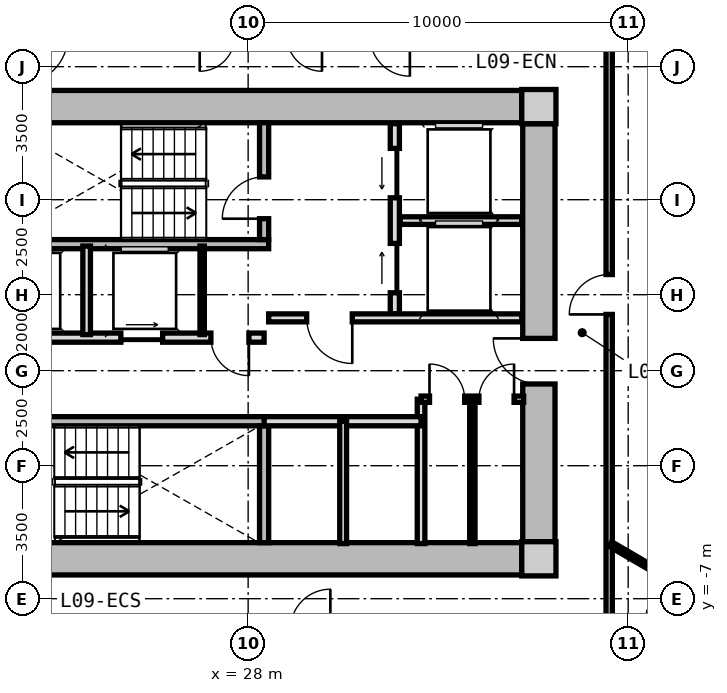
"""IFC4 building model, lengths in metres.
Left out: names, types, materials, properties, quantities, classifications, styles, units other than length and angle.
Written with IfcOpenShell. Run it as: python <this file> out.ifc"""

import sys

from ifc_helpers import new_model, si_unit, direction, frame, frame_2d, origin, origin_2d, place, context, subcontext, project, spatial, rectangle, extrude, source, transform, mapped, element, fill, save


model = new_model("IFC4")
c1 = context("Model", 3, precision=1e-05, world=origin(), true_north=direction((0.0, 1.0)))
c2 = subcontext(c1, "Body", "Model", "MODEL_VIEW")
j1 = project(units=[si_unit("LENGTHUNIT", "METRE"), si_unit("PLANEANGLEUNIT", "RADIAN")], contexts=[c1])
p1 = place(None, origin())
s1 = spatial("IfcSite", under=j1, at=p1, CompositionType="ELEMENT")
p2 = place(p1, origin())
s2 = spatial("IfcBuilding", under=s1, at=p2, CompositionType="ELEMENT")
p3 = place(p2, frame((0.0, 0.0, 33.8)))
s3 = spatial("IfcBuildingStorey", under=s2, at=p3, CompositionType="ELEMENT", Elevation=33.8)
m1 = source(origin(), c2, "Body", "SweptSolid", [
    extrude(rectangle(XDim=0.9, YDim=0.9, at=origin_2d()), origin(), (0.0, 0.0, 1.0), 3.05),
])
for number, where, z_axis, x_axis in (
    (1, (35.65, -5.95, 0.0), (0.0, 0.0, 1.0), (1.0, 0.0, 0.0)),
    (2, (35.65, 5.95, 0.0), (0.0, 0.0, 1.0), (1.0, 0.0, 0.0)),
):
    element("IfcColumn", number, at=place(p3, frame(where, z_axis=z_axis, x_axis=x_axis)), inside=s3, PredefinedType="COLUMN", context=c2, shape_type="MappedRepresentation", body=[
        mapped(m1, transform((0.0, 0.0, 0.0), x_axis=(1.0, 0.0, 0.0), y_axis=(0.0, 1.0, 0.0), z_axis=(0.0, 0.0, 1.0), scale=1.0)),
    ])
m2 = source(origin(), c2, "Body", "SweptSolid", [
    extrude(rectangle(XDim=14.4, YDim=0.85, at=frame_2d((7.2, 0.0))), origin(), (0.0, 0.0, 1.0), 2.79),
])
for number, where, z_axis, x_axis in (
    (3, (20.8, 5.95, 0.0), (0.0, 0.0, 1.0), (1.0, 0.0, 0.0)),
    (4, (35.2, -5.95, 0.0), (0.0, 0.0, 1.0), (-1.0, 0.0, 0.0)),
):
    element("IfcWall", number, at=place(p3, frame(where, z_axis=z_axis, x_axis=x_axis)), inside=s3, PredefinedType="SHEAR", context=c2, shape_type="MappedRepresentation", body=[
        mapped(m2, transform((0.0, 0.0, 0.0), x_axis=(1.0, 0.0, 0.0), y_axis=(0.0, 1.0, 0.0), z_axis=(0.0, 0.0, 1.0), scale=1.0)),
    ])
m3 = source(origin(), c2, "Body", "SweptSolid", [
    extrude(rectangle(XDim=11.0, YDim=0.85, at=frame_2d((5.5, 0.0))), origin(), (0.0, 0.0, 1.0), 2.79),
])
p4 = place(p3, frame((35.65, 5.5, 0.0), z_axis=(0.0, 0.0, 1.0), x_axis=(0.0, -1.0, 0.0)))
e5 = element("IfcWall", 5, at=p4, inside=s3, PredefinedType="SHEAR", context=c2, shape_type="MappedRepresentation", body=[
    mapped(m3, transform((0.0, 0.0, 0.0), x_axis=(1.0, 0.0, 0.0), y_axis=(0.0, 1.0, 0.0), z_axis=(0.0, 0.0, 1.0), scale=1.0)),
])
p5 = place(p4, frame((5.65, 0.0, 0.0)))
e6 = element("IfcOpeningElement", 6, at=p5, cuts=e5, PredefinedType="OPENING", context=c2, shape_type="SweptSolid", body=[
    extrude(rectangle(XDim=1.2, YDim=2.15, at=frame_2d((0.6, 1.075))), frame((0.0, 0.435, 0.0), z_axis=(0.0, -1.0, 0.0), x_axis=(1.0, 0.0, 0.0)), (0.0, 0.0, 1.0), 0.87),
])
m4 = source(origin(), c2, "Body", "SweptSolid", [
    extrude(rectangle(XDim=7.765, YDim=0.24, at=frame_2d((3.883, 0.0))), origin(), (0.0, 0.0, 1.0), 2.79),
])
p6 = place(p3, frame((20.775, 2.33, 0.0), z_axis=(0.0, 0.0, 1.0), x_axis=(1.0, 0.0, 0.0)))
e7 = element("IfcWall", 7, at=p6, inside=s3, PredefinedType="PARTITIONING", context=c2, shape_type="MappedRepresentation", body=[
    mapped(m4, transform((0.0, 0.0, 0.0), x_axis=(1.0, 0.0, 0.0), y_axis=(0.0, 1.0, 0.0), z_axis=(0.0, 0.0, 1.0), scale=1.0)),
])
m5 = source(origin(), c2, "Body", "SweptSolid", [
    extrude(rectangle(XDim=3.075, YDim=0.24, at=frame_2d((1.538, 0.0))), origin(), (0.0, 0.0, 1.0), 2.79),
])
p7 = place(p3, frame((28.42, 2.45, 0.0), z_axis=(0.0, 0.0, 1.0), x_axis=(0.0, 1.0, 0.0)))
e8 = element("IfcWall", 8, at=p7, inside=s3, PredefinedType="PARTITIONING", context=c2, shape_type="MappedRepresentation", body=[
    mapped(m5, transform((0.0, 0.0, 0.0), x_axis=(1.0, 0.0, 0.0), y_axis=(0.0, 1.0, 0.0), z_axis=(0.0, 0.0, 1.0), scale=1.0)),
])
p8 = place(p7, frame((0.55, 0.0, 0.0)))
e9 = element("IfcOpeningElement", 9, at=p8, cuts=e8, PredefinedType="OPENING", context=c2, shape_type="SweptSolid", body=[
    extrude(rectangle(XDim=1.1, YDim=2.15, at=frame_2d((0.55, 1.075))), frame((0.0, 0.13, 0.0), z_axis=(0.0, -1.0, 0.0), x_axis=(1.0, 0.0, 0.0)), (0.0, 0.0, 1.0), 0.26),
])
p9 = place(p3, frame((20.775, -2.33, 0.0), z_axis=(0.0, 0.0, 1.0), x_axis=(1.0, 0.0, 0.0)))
e10 = element("IfcWall", 10, at=p9, inside=s3, PredefinedType="PARTITIONING", context=c2, shape_type="MappedRepresentation", body=[
    mapped(m4, transform((0.0, 0.0, 0.0), x_axis=(1.0, 0.0, 0.0), y_axis=(0.0, 1.0, 0.0), z_axis=(0.0, 0.0, 1.0), scale=1.0)),
])
p10 = place(p9, frame((0.885, 0.0, 0.0)))
e11 = element("IfcOpeningElement", 11, at=p10, cuts=e10, PredefinedType="OPENING", context=c2, shape_type="SweptSolid", body=[
    extrude(rectangle(XDim=1.1, YDim=2.15, at=frame_2d((0.55, 1.075))), frame((0.0, 0.13, 0.0), z_axis=(0.0, -1.0, 0.0), x_axis=(1.0, 0.0, 0.0)), (0.0, 0.0, 1.0), 0.26),
])
p11 = place(p3, frame((28.42, -5.525, 0.0), z_axis=(0.0, 0.0, 1.0), x_axis=(0.0, 1.0, 0.0)))
e12 = element("IfcWall", 12, at=p11, inside=s3, PredefinedType="PARTITIONING", context=c2, shape_type="MappedRepresentation", body=[
    mapped(m5, transform((0.0, 0.0, 0.0), x_axis=(1.0, 0.0, 0.0), y_axis=(0.0, 1.0, 0.0), z_axis=(0.0, 0.0, 1.0), scale=1.0)),
])
m6 = source(origin(), c2, "Body", "SweptSolid", [
    extrude(rectangle(XDim=5.0, YDim=0.24, at=frame_2d((2.5, 0.0))), origin(), (0.0, 0.0, 1.0), 2.775),
])
p12 = place(p3, frame((31.86, 0.5, 0.0), z_axis=(0.0, 0.0, 1.0), x_axis=(0.0, 1.0, 0.0)))
e13 = element("IfcWall", 13, at=p12, inside=s3, PredefinedType="PARTITIONING", context=c2, shape_type="MappedRepresentation", body=[
    mapped(m6, transform((0.0, 0.0, 0.0), x_axis=(1.0, 0.0, 0.0), y_axis=(0.0, 1.0, 0.0), z_axis=(0.0, 0.0, 1.0), scale=1.0)),
])
p13 = place(p12, frame((3.05, 0.0, 0.0)))
e14 = element("IfcOpeningElement", 14, at=p13, cuts=e13, PredefinedType="OPENING", context=c2, shape_type="SweptSolid", body=[
    extrude(rectangle(XDim=1.3, YDim=2.2, at=frame_2d((0.65, 1.1))), frame((0.0, 0.13, 0.0), z_axis=(0.0, -1.0, 0.0), x_axis=(1.0, 0.0, 0.0)), (0.0, 0.0, 1.0), 0.26),
])
p14 = place(p12, frame((0.55, 0.0, 0.0)))
e15 = element("IfcOpeningElement", 15, at=p14, cuts=e13, PredefinedType="OPENING", context=c2, shape_type="SweptSolid", body=[
    extrude(rectangle(XDim=1.3, YDim=2.2, at=frame_2d((0.65, 1.1))), frame((0.0, 0.13, 0.0), z_axis=(0.0, -1.0, 0.0), x_axis=(1.0, 0.0, 0.0)), (0.0, 0.0, 1.0), 0.26),
])
m7 = source(origin(), c2, "Body", "SweptSolid", [
    extrude(rectangle(XDim=3.2, YDim=0.2, at=frame_2d((1.6, 0.0))), origin(), (0.0, 0.0, 1.0), 2.775),
])
p15 = place(p3, frame((32.0, 2.95, 0.0), z_axis=(0.0, 0.0, 1.0), x_axis=(1.0, 0.0, 0.0)))
e16 = element("IfcWall", 16, at=p15, inside=s3, PredefinedType="PARTITIONING", context=c2, shape_type="MappedRepresentation", body=[
    mapped(m7, transform((0.0, 0.0, 0.0), x_axis=(1.0, 0.0, 0.0), y_axis=(0.0, 1.0, 0.0), z_axis=(0.0, 0.0, 1.0), scale=1.0)),
])
m8 = source(origin(), c2, "Body", "SweptSolid", [
    extrude(rectangle(XDim=6.66, YDim=0.21, at=frame_2d((3.33, 0.0))), origin(), (0.0, 0.0, 1.0), 2.775),
])
p16 = place(p3, frame((28.54, 0.39, 0.0), z_axis=(0.0, 0.0, 1.0), x_axis=(1.0, 0.0, 0.0)))
e17 = element("IfcWall", 17, at=p16, inside=s3, PredefinedType="PARTITIONING", context=c2, shape_type="MappedRepresentation", body=[
    mapped(m8, transform((0.0, 0.0, 0.0), x_axis=(1.0, 0.0, 0.0), y_axis=(0.0, 1.0, 0.0), z_axis=(0.0, 0.0, 1.0), scale=1.0)),
])
p17 = place(p16, frame((1.0, 0.0, 0.0)))
e18 = element("IfcOpeningElement", 18, at=p17, cuts=e17, PredefinedType="OPENING", context=c2, shape_type="SweptSolid", body=[
    extrude(rectangle(XDim=1.2, YDim=2.15, at=frame_2d((0.6, 1.075))), frame((0.0, 0.115, 0.0), z_axis=(0.0, -1.0, 0.0), x_axis=(1.0, 0.0, 0.0)), (0.0, 0.0, 1.0), 0.23),
])
m9 = source(origin(), c2, "Body", "SweptSolid", [
    extrude(rectangle(XDim=7.62, YDim=0.24, at=frame_2d((3.81, 0.0))), origin(), (0.0, 0.0, 1.0), 2.775),
])
p18 = place(p3, frame((20.8, -0.13, 0.0), z_axis=(0.0, 0.0, 1.0), x_axis=(1.0, 0.0, 0.0)))
e19 = element("IfcWall", 19, at=p18, inside=s3, PredefinedType="PARTITIONING", context=c2, shape_type="MappedRepresentation", body=[
    mapped(m9, transform((0.0, 0.0, 0.0), x_axis=(1.0, 0.0, 0.0), y_axis=(0.0, 1.0, 0.0), z_axis=(0.0, 0.0, 1.0), scale=1.0)),
])
p19 = place(p18, frame((6.22, 0.0, 0.0)))
e20 = element("IfcOpeningElement", 20, at=p19, cuts=e19, PredefinedType="OPENING", context=c2, shape_type="SweptSolid", body=[
    extrude(rectangle(XDim=1.0, YDim=2.1, at=frame_2d((0.5, 1.05))), frame((0.0, 0.13, 0.0), z_axis=(0.0, -1.0, 0.0), x_axis=(1.0, 0.0, 0.0)), (0.0, 0.0, 1.0), 0.26),
])
p20 = place(p18, frame((0.85, 0.0, 0.0)))
e21 = element("IfcOpeningElement", 21, at=p20, cuts=e19, PredefinedType="OPENING", context=c2, shape_type="SweptSolid", body=[
    extrude(rectangle(XDim=1.1, YDim=2.2, at=frame_2d((0.55, 1.1))), frame((0.0, 0.13, 0.0), z_axis=(0.0, -1.0, 0.0), x_axis=(1.0, 0.0, 0.0)), (0.0, 0.0, 1.0), 0.26),
])
p21 = place(p18, frame((3.85, 0.0, 0.0)))
e22 = element("IfcOpeningElement", 22, at=p21, cuts=e19, PredefinedType="OPENING", context=c2, shape_type="SweptSolid", body=[
    extrude(rectangle(XDim=1.1, YDim=2.2, at=frame_2d((0.55, 1.1))), frame((0.0, 0.13, 0.0), z_axis=(0.0, -1.0, 0.0), x_axis=(1.0, 0.0, 0.0)), (0.0, 0.0, 1.0), 0.26),
])
m10 = source(origin(), c2, "Body", "SweptSolid", [
    extrude(rectangle(XDim=2.33, YDim=0.115, at=frame_2d((1.165, 0.0))), origin(), (0.0, 0.0, 1.0), 2.775),
])
p22 = place(p3, frame((26.79, -0.05, 0.0), z_axis=(0.0, 0.0, 1.0), x_axis=(0.0, 1.0, 0.0)))
e23 = element("IfcWall", 23, at=p22, inside=s3, PredefinedType="PARTITIONING", context=c2, shape_type="MappedRepresentation", body=[
    mapped(m10, transform((0.0, 0.0, 0.0), x_axis=(1.0, 0.0, 0.0), y_axis=(0.0, 1.0, 0.0), z_axis=(0.0, 0.0, 1.0), scale=1.0)),
])
m11 = source(origin(), c2, "Body", "SweptSolid", [
    extrude(rectangle(XDim=2.33, YDim=0.2, at=frame_2d((1.165, 0.0))), origin(), (0.0, 0.0, 1.0), 2.775),
])
p23 = place(p3, frame((23.75, -0.05, 0.0), z_axis=(0.0, 0.0, 1.0), x_axis=(0.0, 1.0, 0.0)))
e24 = element("IfcWall", 24, at=p23, inside=s3, PredefinedType="PARTITIONING", context=c2, shape_type="MappedRepresentation", body=[
    mapped(m11, transform((0.0, 0.0, 0.0), x_axis=(1.0, 0.0, 0.0), y_axis=(0.0, 1.0, 0.0), z_axis=(0.0, 0.0, 1.0), scale=1.0)),
])
m12 = source(origin(), c2, "Body", "SweptSolid", [
    extrude(rectangle(XDim=3.8, YDim=0.2, at=frame_2d((1.9, 0.0))), origin(), (0.0, 0.0, 1.0), 2.775),
])
p24 = place(p3, frame((32.55, -5.55, 0.0), z_axis=(0.0, 0.0, 1.0), x_axis=(0.0, 1.0, 0.0)))
e25 = element("IfcWall", 25, at=p24, inside=s3, PredefinedType="PARTITIONING", context=c2, shape_type="MappedRepresentation", body=[
    mapped(m12, transform((0.0, 0.0, 0.0), x_axis=(1.0, 0.0, 0.0), y_axis=(0.0, 1.0, 0.0), z_axis=(0.0, 0.0, 1.0), scale=1.0)),
])
m13 = source(origin(), c2, "Body", "SweptSolid", [
    extrude(rectangle(XDim=4.13, YDim=0.24, at=frame_2d((2.065, 0.0))), origin(), (0.0, 0.0, 1.0), 2.775),
])
p25 = place(p3, frame((28.42, -2.33, 0.0), z_axis=(0.0, 0.0, 1.0), x_axis=(1.0, 0.0, 0.0)))
e26 = element("IfcWall", 26, at=p25, inside=s3, PredefinedType="PARTITIONING", context=c2, shape_type="MappedRepresentation", body=[
    mapped(m13, transform((0.0, 0.0, 0.0), x_axis=(1.0, 0.0, 0.0), y_axis=(0.0, 1.0, 0.0), z_axis=(0.0, 0.0, 1.0), scale=1.0)),
])
m14 = source(origin(), c2, "Body", "SweptSolid", [
    extrude(rectangle(XDim=3.22, YDim=0.18, at=frame_2d((1.61, 0.0))), origin(), (0.0, 0.0, 1.0), 2.775),
])
p26 = place(p3, frame((30.5, -5.55, 0.0), z_axis=(0.0, 0.0, 1.0), x_axis=(0.0, 1.0, 0.0)))
e27 = element("IfcWall", 27, at=p26, inside=s3, PredefinedType="PARTITIONING", context=c2, shape_type="MappedRepresentation", body=[
    mapped(m14, transform((0.0, 0.0, 0.0), x_axis=(1.0, 0.0, 0.0), y_axis=(0.0, 1.0, 0.0), z_axis=(0.0, 0.0, 1.0), scale=1.0)),
])
m15 = source(origin(), c2, "Body", "SweptSolid", [
    extrude(rectangle(XDim=2.7, YDim=0.165, at=frame_2d((1.35, 0.0))), origin(), (0.0, 0.0, 1.0), 2.775),
])
p27 = place(p3, frame((32.55, -1.75, 0.0), z_axis=(0.0, 0.0, 1.0), x_axis=(1.0, 0.0, 0.0)))
e28 = element("IfcWall", 28, at=p27, inside=s3, PredefinedType="PARTITIONING", context=c2, shape_type="MappedRepresentation", body=[
    mapped(m15, transform((0.0, 0.0, 0.0), x_axis=(1.0, 0.0, 0.0), y_axis=(0.0, 1.0, 0.0), z_axis=(0.0, 0.0, 1.0), scale=1.0)),
])
p28 = place(p27, frame((0.222, 0.0, 0.0)))
e29 = element("IfcOpeningElement", 29, at=p28, cuts=e28, PredefinedType="OPENING", context=c2, shape_type="SweptSolid", body=[
    extrude(rectangle(XDim=0.925, YDim=2.1, at=frame_2d((0.462, 1.05))), frame((0.0, 0.093, 0.0), z_axis=(0.0, -1.0, 0.0), x_axis=(1.0, 0.0, 0.0)), (0.0, 0.0, 1.0), 0.185),
])
p29 = place(p27, frame((1.522, 0.0, 0.0)))
e30 = element("IfcOpeningElement", 30, at=p29, cuts=e28, PredefinedType="OPENING", context=c2, shape_type="SweptSolid", body=[
    extrude(rectangle(XDim=0.925, YDim=2.1, at=frame_2d((0.462, 1.05))), frame((0.0, 0.093, 0.0), z_axis=(0.0, -1.0, 0.0), x_axis=(1.0, 0.0, 0.0)), (0.0, 0.0, 1.0), 0.185),
])
m16 = source(origin(), c2, "Body", "SweptSolid", [
    extrude(rectangle(XDim=3.8, YDim=0.14, at=frame_2d((1.9, 0.0))), origin(), (0.0, 0.0, 1.0), 2.775),
])
p30 = place(p3, frame((33.9, -5.55, 0.0), z_axis=(0.0, 0.0, 1.0), x_axis=(0.0, 1.0, 0.0)))
e31 = element("IfcWall", 31, at=p30, inside=s3, PredefinedType="PARTITIONING", context=c2, shape_type="MappedRepresentation", body=[
    mapped(m16, transform((0.0, 0.0, 0.0), x_axis=(1.0, 0.0, 0.0), y_axis=(0.0, 1.0, 0.0), z_axis=(0.0, 0.0, 1.0), scale=1.0)),
])
m17 = source(origin(), c2, "Body", "SweptSolid", [
    extrude(rectangle(XDim=15.6, YDim=0.165, at=frame_2d((7.8, 0.0))), origin(), (0.0, 0.0, 1.0), 2.775),
])
p31 = place(p3, frame((37.5, 7.8, 0.0), z_axis=(0.0, 0.0, 1.0), x_axis=(0.0, -1.0, 0.0)))
e32 = element("IfcWall", 32, at=p31, inside=s3, PredefinedType="PARTITIONING", context=c2, shape_type="MappedRepresentation", body=[
    mapped(m17, transform((0.0, 0.0, 0.0), x_axis=(1.0, 0.0, 0.0), y_axis=(0.0, 1.0, 0.0), z_axis=(0.0, 0.0, 1.0), scale=1.0)),
])
p32 = place(p31, frame((6.269, 0.0, 0.0)))
e33 = element("IfcOpeningElement", 33, at=p32, cuts=e32, PredefinedType="OPENING", context=c2, shape_type="SweptSolid", body=[
    extrude(rectangle(XDim=1.05, YDim=2.15, at=frame_2d((0.525, 1.075))), frame((0.0, 0.093, 0.0), z_axis=(0.0, -1.0, 0.0), x_axis=(1.0, 0.0, 0.0)), (0.0, 0.0, 1.0), 0.185),
])
m18 = source(origin(), c2, "Body", "SweptSolid", [
    extrude(rectangle(XDim=2.669, YDim=0.14, at=frame_2d((1.335, 0.0))), origin(), (0.0, 0.0, 1.0), 2.775),
])
p33 = place(p3, frame((37.53, -5.561, 0.0), z_axis=(0.0, 0.0, 1.0), x_axis=(0.86369928178, -0.50400749067, 0.0)))
e34 = element("IfcWall", 34, at=p33, inside=s3, PredefinedType="PARTITIONING", context=c2, shape_type="MappedRepresentation", body=[
    mapped(m18, transform((0.0, 0.0, 0.0), x_axis=(1.0, 0.0, 0.0), y_axis=(0.0, 1.0, 0.0), z_axis=(0.0, 0.0, 1.0), scale=1.0)),
])
m19 = source(origin(), c2, "Body", "SweptSolid", [
    extrude(rectangle(XDim=3.121, YDim=0.14, at=frame_2d((1.561, 0.0))), origin(), (0.0, 0.0, 1.0), 2.775),
])
p34 = place(p3, frame((39.836, -6.906, 0.0), z_axis=(0.0, 0.0, 1.0), x_axis=(-0.487302357327, -0.873233309342, 0.0)))
e35 = element("IfcWall", 35, at=p34, inside=s3, PredefinedType="PARTITIONING", context=c2, shape_type="MappedRepresentation", body=[
    mapped(m19, transform((0.0, 0.0, 0.0), x_axis=(1.0, 0.0, 0.0), y_axis=(0.0, 1.0, 0.0), z_axis=(0.0, 0.0, 1.0), scale=1.0)),
])
p35 = place(p34, frame((1.101, 0.0, 0.0)))
e36 = element("IfcOpeningElement", 36, at=p35, cuts=e35, PredefinedType="OPENING", context=c2, shape_type="SweptSolid", body=[
    extrude(rectangle(XDim=0.92, YDim=2.1, at=frame_2d((0.46, 1.05))), frame((0.0, 0.08, 0.0), z_axis=(0.0, -1.0, 0.0), x_axis=(1.0, 0.0, 0.0)), (0.0, 0.0, 1.0), 0.16),
])
m20 = source(origin(), c2, "Body", "SweptSolid", [
    extrude(rectangle(XDim=1.1, YDim=2.15, at=frame_2d((0.55, 1.075))), frame((0.0, 0.025, 0.0), z_axis=(0.0, -1.0, 0.0), x_axis=(1.0, 0.0, 0.0)), (0.0, 0.0, 1.0), 0.05),
])
p36 = place(p8, origin())
e37 = element("IfcDoor", 37, at=p36, inside=s3, OperationType="SINGLE_SWING_LEFT", PredefinedType="DOOR", context=c2, shape_type="MappedRepresentation", body=[
    mapped(m20, transform((0.0, 0.0, 0.0), x_axis=(1.0, 0.0, 0.0), y_axis=(0.0, 1.0, 0.0), z_axis=(0.0, 0.0, 1.0), scale=1.0)),
])
fill(e9, e37)
m21 = source(origin(), c2, "Body", "SweptSolid", [
    extrude(rectangle(XDim=1.3, YDim=2.2, at=frame_2d((0.65, 1.1))), frame((0.0, 0.025, 0.0), z_axis=(0.0, -1.0, 0.0), x_axis=(1.0, 0.0, 0.0)), (0.0, 0.0, 1.0), 0.05),
])
p37 = place(p13, origin())
e38 = element("IfcDoor", 38, at=p37, inside=s3, OperationType="SLIDING_TO_LEFT", PredefinedType="DOOR", context=c2, shape_type="MappedRepresentation", body=[
    mapped(m21, transform((0.0, 0.0, 0.0), x_axis=(1.0, 0.0, 0.0), y_axis=(0.0, 1.0, 0.0), z_axis=(0.0, 0.0, 1.0), scale=1.0)),
])
fill(e14, e38)
p38 = place(p14, origin())
e39 = element("IfcDoor", 39, at=p38, inside=s3, OperationType="SLIDING_TO_RIGHT", PredefinedType="DOOR", context=c2, shape_type="MappedRepresentation", body=[
    mapped(m21, transform((0.0, 0.0, 0.0), x_axis=(1.0, 0.0, 0.0), y_axis=(0.0, 1.0, 0.0), z_axis=(0.0, 0.0, 1.0), scale=1.0)),
])
fill(e15, e39)
m22 = source(origin(), c2, "Body", "SweptSolid", [
    extrude(rectangle(XDim=1.2, YDim=2.15, at=frame_2d((0.6, 1.075))), frame((0.0, 0.025, 0.0), z_axis=(0.0, -1.0, 0.0), x_axis=(1.0, 0.0, 0.0)), (0.0, 0.0, 1.0), 0.05),
])
p39 = place(p17, frame((1.2, 0.0, 0.0), z_axis=(0.0, 0.0, 1.0), x_axis=(-1.0, 0.0, 0.0)))
e40 = element("IfcDoor", 40, at=p39, inside=s3, OperationType="SINGLE_SWING_LEFT", PredefinedType="DOOR", context=c2, shape_type="MappedRepresentation", body=[
    mapped(m22, transform((0.0, 0.0, 0.0), x_axis=(1.0, 0.0, 0.0), y_axis=(0.0, 1.0, 0.0), z_axis=(0.0, 0.0, 1.0), scale=1.0)),
])
fill(e18, e40)
p40 = place(p5, frame((1.2, 0.0, 0.0), z_axis=(0.0, 0.0, 1.0), x_axis=(-1.0, 0.0, 0.0)))
e41 = element("IfcDoor", 41, at=p40, inside=s3, OperationType="SINGLE_SWING_RIGHT", PredefinedType="DOOR", context=c2, shape_type="MappedRepresentation", body=[
    mapped(m22, transform((0.0, 0.0, 0.0), x_axis=(1.0, 0.0, 0.0), y_axis=(0.0, 1.0, 0.0), z_axis=(0.0, 0.0, 1.0), scale=1.0)),
])
fill(e6, e41)
m23 = source(origin(), c2, "Body", "SweptSolid", [
    extrude(rectangle(XDim=1.0, YDim=2.1, at=frame_2d((0.5, 1.05))), frame((0.0, 0.025, 0.0), z_axis=(0.0, -1.0, 0.0), x_axis=(1.0, 0.0, 0.0)), (0.0, 0.0, 1.0), 0.05),
])
p41 = place(p19, frame((1.0, 0.0, 0.0), z_axis=(0.0, 0.0, 1.0), x_axis=(-1.0, 0.0, 0.0)))
e42 = element("IfcDoor", 42, at=p41, inside=s3, OperationType="SINGLE_SWING_LEFT", PredefinedType="DOOR", context=c2, shape_type="MappedRepresentation", body=[
    mapped(m23, transform((0.0, 0.0, 0.0), x_axis=(1.0, 0.0, 0.0), y_axis=(0.0, 1.0, 0.0), z_axis=(0.0, 0.0, 1.0), scale=1.0)),
])
fill(e20, e42)
m24 = source(origin(), c2, "Body", "SweptSolid", [
    extrude(rectangle(XDim=1.1, YDim=2.2, at=frame_2d((0.55, 1.1))), frame((0.0, 0.025, 0.0), z_axis=(0.0, -1.0, 0.0), x_axis=(1.0, 0.0, 0.0)), (0.0, 0.0, 1.0), 0.05),
])
p42 = place(p21, origin())
e43 = element("IfcDoor", 43, at=p42, inside=s3, OperationType="SLIDING_TO_RIGHT", PredefinedType="DOOR", context=c2, shape_type="MappedRepresentation", body=[
    mapped(m24, transform((0.0, 0.0, 0.0), x_axis=(1.0, 0.0, 0.0), y_axis=(0.0, 1.0, 0.0), z_axis=(0.0, 0.0, 1.0), scale=1.0)),
])
fill(e22, e43)
m25 = source(origin(), c2, "Body", "SweptSolid", [
    extrude(rectangle(XDim=0.925, YDim=2.1, at=frame_2d((0.462, 1.05))), frame((0.0, 0.025, 0.0), z_axis=(0.0, -1.0, 0.0), x_axis=(1.0, 0.0, 0.0)), (0.0, 0.0, 1.0), 0.05),
])
p43 = place(p28, origin())
e44 = element("IfcDoor", 44, at=p43, inside=s3, OperationType="SINGLE_SWING_LEFT", PredefinedType="DOOR", context=c2, shape_type="MappedRepresentation", body=[
    mapped(m25, transform((0.0, 0.0, 0.0), x_axis=(1.0, 0.0, 0.0), y_axis=(0.0, 1.0, 0.0), z_axis=(0.0, 0.0, 1.0), scale=1.0)),
])
fill(e29, e44)
p44 = place(p29, origin())
e45 = element("IfcDoor", 45, at=p44, inside=s3, OperationType="SINGLE_SWING_RIGHT", PredefinedType="DOOR", context=c2, shape_type="MappedRepresentation", body=[
    mapped(m25, transform((0.0, 0.0, 0.0), x_axis=(1.0, 0.0, 0.0), y_axis=(0.0, 1.0, 0.0), z_axis=(0.0, 0.0, 1.0), scale=1.0)),
])
fill(e30, e45)
m26 = source(origin(), c2, "Body", "SweptSolid", [
    extrude(rectangle(XDim=1.05, YDim=2.15, at=frame_2d((0.525, 1.075))), frame((0.0, 0.025, 0.0), z_axis=(0.0, -1.0, 0.0), x_axis=(1.0, 0.0, 0.0)), (0.0, 0.0, 1.0), 0.05),
])
p45 = place(p32, frame((1.05, 0.0, 0.0), z_axis=(0.0, 0.0, 1.0), x_axis=(-1.0, 0.0, 0.0)))
e46 = element("IfcDoor", 46, at=p45, inside=s3, OperationType="SINGLE_SWING_LEFT", PredefinedType="DOOR", context=c2, shape_type="MappedRepresentation", body=[
    mapped(m26, transform((0.0, 0.0, 0.0), x_axis=(1.0, 0.0, 0.0), y_axis=(0.0, 1.0, 0.0), z_axis=(0.0, 0.0, 1.0), scale=1.0)),
])
fill(e33, e46)
save(model, sys.argv[1])
